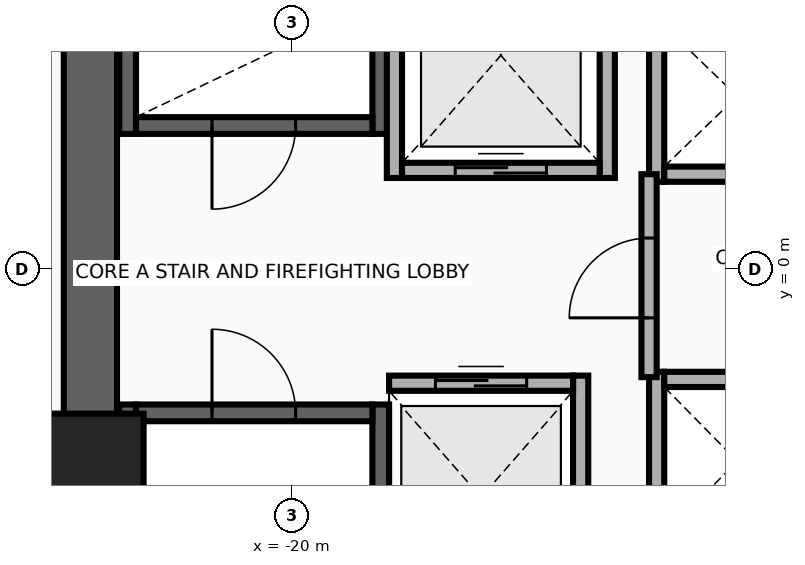
"""IFC4 building model, lengths in metres.
Left out: names, types, materials, properties, quantities, classifications, styles, units other than length and angle.
Written with IfcOpenShell. Run it as: python <this file> out.ifc"""

import sys

from ifc_helpers import new_model, si_unit, direction, frame, frame_2d, origin, origin_2d, place, context, subcontext, project, spatial, rectangle, extrude, source, transform, mapped, element, fill, save


model = new_model("IFC4")
c1 = context("Model", 3, precision=1e-05, world=origin(), true_north=direction((0.0, 1.0)))
c2 = subcontext(c1, "Body", "Model", "MODEL_VIEW")
j1 = project(units=[si_unit("LENGTHUNIT", "METRE"), si_unit("PLANEANGLEUNIT", "RADIAN")], contexts=[c1])
p1 = place(None, origin())
s1 = spatial("IfcSite", under=j1, at=p1, CompositionType="ELEMENT")
p2 = place(p1, origin())
s2 = spatial("IfcBuilding", under=s1, at=p2, CompositionType="ELEMENT")
p3 = place(p2, frame((0.0, 0.0, 96.3)))
s3 = spatial("IfcBuildingStorey", under=s2, at=p3, CompositionType="ELEMENT", Elevation=96.3)
for number, where, z_axis, x_axis in (
    (1, (-22.16, 1.78, 0.0), (0.0, 0.0, 1.0), (0.0, 1.0, 0.0)),
    (2, (-18.83, 1.78, 0.0), (0.0, 0.0, 1.0), (0.0, 1.0, 0.0)),
):
    element("IfcWall", number, at=place(p3, frame(where, z_axis=z_axis, x_axis=x_axis)), inside=s3, PredefinedType="SHEAR", context=c2, shape_type="SweptSolid", body=[
        extrude(rectangle(XDim=8.67, YDim=0.22, at=frame_2d((4.335, 0.0))), origin(), (0.0, 0.0, 1.0), 4.56),
    ])
p4 = place(p3, frame((-22.05, 1.89, 0.0), z_axis=(0.0, 0.0, 1.0), x_axis=(1.0, 0.0, 0.0)))
e3 = element("IfcWall", 3, at=p4, inside=s3, PredefinedType="SHEAR", context=c2, shape_type="SweptSolid", body=[
    extrude(rectangle(XDim=3.11, YDim=0.22, at=frame_2d((1.555, 0.0))), origin(), (0.0, 0.0, 1.0), 4.56),
])
p5 = place(p4, frame((1.0, 0.0, 0.0)))
e4 = element("IfcOpeningElement", 4, at=p5, cuts=e3, PredefinedType="OPENING", context=c2, shape_type="SweptSolid", body=[
    extrude(rectangle(XDim=1.1, YDim=2.15, at=frame_2d((0.55, 1.075))), frame((0.0, 0.125, 0.0), z_axis=(0.0, -1.0, 0.0), x_axis=(1.0, 0.0, 0.0)), (0.0, 0.0, 1.0), 0.25),
])
for number, where, z_axis, x_axis in (
    (5, (-22.16, -10.45, 0.0), (0.0, 0.0, 1.0), (0.0, 1.0, 0.0)),
    (6, (-18.83, -10.45, 0.0), (0.0, 0.0, 1.0), (0.0, 1.0, 0.0)),
):
    element("IfcWall", number, at=place(p3, frame(where, z_axis=z_axis, x_axis=x_axis)), inside=s3, PredefinedType="SHEAR", context=c2, shape_type="SweptSolid", body=[
        extrude(rectangle(XDim=8.67, YDim=0.22, at=frame_2d((4.335, 0.0))), origin(), (0.0, 0.0, 1.0), 4.56),
    ])
p6 = place(p3, frame((-22.05, -1.89, 0.0), z_axis=(0.0, 0.0, 1.0), x_axis=(1.0, 0.0, 0.0)))
e7 = element("IfcWall", 7, at=p6, inside=s3, PredefinedType="SHEAR", context=c2, shape_type="SweptSolid", body=[
    extrude(rectangle(XDim=3.11, YDim=0.22, at=frame_2d((1.555, 0.0))), origin(), (0.0, 0.0, 1.0), 4.56),
])
p7 = place(p6, frame((1.0, 0.0, 0.0)))
e8 = element("IfcOpeningElement", 8, at=p7, cuts=e7, PredefinedType="OPENING", context=c2, shape_type="SweptSolid", body=[
    extrude(rectangle(XDim=1.1, YDim=2.15, at=frame_2d((0.55, 1.075))), frame((0.0, 0.125, 0.0), z_axis=(0.0, -1.0, 0.0), x_axis=(1.0, 0.0, 0.0)), (0.0, 0.0, 1.0), 0.25),
])
p8 = place(p3, frame((-22.65, -11.15, 0.0), z_axis=(0.0, 0.0, 1.0), x_axis=(0.0, 1.0, 0.0)))
e9 = element("IfcWall", 9, at=p8, inside=s3, PredefinedType="SHEAR", context=c2, shape_type="SweptSolid", body=[
    extrude(rectangle(XDim=22.3, YDim=0.7, at=frame_2d((11.15, 0.0))), origin(), (0.0, 0.0, 1.0), 4.56),
])
m1 = source(origin(), c2, "Body", "SweptSolid", [
    extrude(rectangle(XDim=1.4, YDim=1.4, at=origin_2d()), origin(), (0.0, 0.0, 1.0), 4.8),
])
p9 = place(p3, frame((-22.65, -2.6, 0.0), z_axis=(0.0, 0.0, 1.0), x_axis=(1.0, 0.0, 0.0)))
e10 = element("IfcColumn", 10, at=p9, inside=s3, PredefinedType="COLUMN", context=c2, shape_type="MappedRepresentation", body=[
    mapped(m1, transform((0.0, 0.0, 0.0), x_axis=(1.0, 0.0, 0.0), y_axis=(0.0, 1.0, 0.0), z_axis=(0.0, 0.0, 1.0), scale=1.0)),
])
for number, where, z_axis, x_axis in (
    (11, (-18.65, 1.2, 0.0), (0.0, 0.0, 1.0), (0.0, 1.0, 0.0)),
    (12, (-15.85, 1.2, 0.0), (0.0, 0.0, 1.0), (0.0, 1.0, 0.0)),
):
    element("IfcWall", number, at=place(p3, frame(where, z_axis=z_axis, x_axis=x_axis)), inside=s3, PredefinedType="MOVABLE", context=c2, shape_type="SweptSolid", body=[
        extrude(rectangle(XDim=3.225, YDim=0.2, at=frame_2d((1.613, 0.0))), origin(), (0.0, 0.0, 1.0), 4.56),
    ])
p10 = place(p3, frame((-18.55, 1.3, 0.0), z_axis=(0.0, 0.0, 1.0), x_axis=(1.0, 0.0, 0.0)))
e13 = element("IfcWall", 13, at=p10, inside=s3, PredefinedType="MOVABLE", context=c2, shape_type="SweptSolid", body=[
    extrude(rectangle(XDim=2.6, YDim=0.2, at=frame_2d((1.3, 0.0))), origin(), (0.0, 0.0, 1.0), 4.56),
])
p11 = place(p10, frame((0.7, 0.0, 0.0)))
e14 = element("IfcOpeningElement", 14, at=p11, cuts=e13, PredefinedType="OPENING", context=c2, shape_type="SweptSolid", body=[
    extrude(rectangle(XDim=1.2, YDim=2.1, at=frame_2d((0.6, 1.05))), frame((0.0, 0.115, 0.0), z_axis=(0.0, -1.0, 0.0), x_axis=(1.0, 0.0, 0.0)), (0.0, 0.0, 1.0), 0.23),
])
p12 = place(p3, frame((-16.2, -4.6, 0.0), z_axis=(0.0, 0.0, 1.0), x_axis=(0.0, 1.0, 0.0)))
e15 = element("IfcWall", 15, at=p12, inside=s3, PredefinedType="MOVABLE", context=c2, shape_type="SweptSolid", body=[
    extrude(rectangle(XDim=3.2, YDim=0.2, at=frame_2d((1.6, 0.0))), origin(), (0.0, 0.0, 1.0), 4.56),
])
p13 = place(p3, frame((-18.72, -1.5, 0.0), z_axis=(0.0, 0.0, 1.0), x_axis=(1.0, 0.0, 0.0)))
e16 = element("IfcWall", 16, at=p13, inside=s3, PredefinedType="MOVABLE", context=c2, shape_type="SweptSolid", body=[
    extrude(rectangle(XDim=2.42, YDim=0.2, at=frame_2d((1.21, 0.0))), origin(), (0.0, 0.0, 1.0), 4.56),
])
p14 = place(p13, frame((0.61, 0.0, 0.0)))
e17 = element("IfcOpeningElement", 17, at=p14, cuts=e16, PredefinedType="OPENING", context=c2, shape_type="SweptSolid", body=[
    extrude(rectangle(XDim=1.2, YDim=2.1, at=frame_2d((0.6, 1.05))), frame((0.0, 0.115, 0.0), z_axis=(0.0, -1.0, 0.0), x_axis=(1.0, 0.0, 0.0)), (0.0, 0.0, 1.0), 0.23),
])
p15 = place(p3, frame((-15.2, 1.15, 0.0), z_axis=(0.0, 0.0, 1.0), x_axis=(0.0, 1.0, 0.0)))
e18 = element("IfcWall", 18, at=p15, inside=s3, PredefinedType="MOVABLE", context=c2, shape_type="SweptSolid", body=[
    extrude(rectangle(XDim=2.25, YDim=0.2, at=frame_2d((1.125, 0.0))), origin(), (0.0, 0.0, 1.0), 4.56),
])
p16 = place(p3, frame((-15.1, 1.25, 0.0), z_axis=(0.0, 0.0, 1.0), x_axis=(1.0, 0.0, 0.0)))
e19 = element("IfcWall", 19, at=p16, inside=s3, PredefinedType="MOVABLE", context=c2, shape_type="SweptSolid", body=[
    extrude(rectangle(XDim=1.92, YDim=0.2, at=frame_2d((0.96, 0.0))), origin(), (0.0, 0.0, 1.0), 4.56),
])
p17 = place(p3, frame((-15.2, -3.7, 0.0), z_axis=(0.0, 0.0, 1.0), x_axis=(0.0, 1.0, 0.0)))
e20 = element("IfcWall", 20, at=p17, inside=s3, PredefinedType="MOVABLE", context=c2, shape_type="SweptSolid", body=[
    extrude(rectangle(XDim=2.35, YDim=0.2, at=frame_2d((1.175, 0.0))), origin(), (0.0, 0.0, 1.0), 4.56),
])
p18 = place(p3, frame((-15.1, -1.45, 0.0), z_axis=(0.0, 0.0, 1.0), x_axis=(1.0, 0.0, 0.0)))
e21 = element("IfcWall", 21, at=p18, inside=s3, PredefinedType="MOVABLE", context=c2, shape_type="SweptSolid", body=[
    extrude(rectangle(XDim=1.92, YDim=0.2, at=frame_2d((0.96, 0.0))), origin(), (0.0, 0.0, 1.0), 4.56),
])
p19 = place(p3, frame((-15.3, -1.42, 0.0), z_axis=(0.0, 0.0, 1.0), x_axis=(0.0, 1.0, 0.0)))
e22 = element("IfcWall", 22, at=p19, inside=s3, PredefinedType="PARTITIONING", context=c2, shape_type="SweptSolid", body=[
    extrude(rectangle(XDim=2.67, YDim=0.2, at=frame_2d((1.335, 0.0))), origin(), (0.0, 0.0, 1.0), 4.56),
])
p20 = place(p19, frame((0.78, 0.0, 0.0)))
e23 = element("IfcOpeningElement", 23, at=p20, cuts=e22, PredefinedType="OPENING", context=c2, shape_type="SweptSolid", body=[
    extrude(rectangle(XDim=1.05, YDim=2.15, at=frame_2d((0.525, 1.075))), frame((0.0, 0.115, 0.0), z_axis=(0.0, -1.0, 0.0), x_axis=(1.0, 0.0, 0.0)), (0.0, 0.0, 1.0), 0.23),
])
p21 = place(p11, origin())
e24 = element("IfcDoor", 24, at=p21, inside=s3, OperationType="DOUBLE_DOOR_SLIDING", PredefinedType="DOOR", context=c2, shape_type="SweptSolid", body=[
    extrude(rectangle(XDim=1.2, YDim=2.1, at=frame_2d((0.6, 1.05))), frame((0.0, 0.025, 0.0), z_axis=(0.0, -1.0, 0.0), x_axis=(1.0, 0.0, 0.0)), (0.0, 0.0, 1.0), 0.05),
])
fill(e14, e24)
p22 = place(p14, origin())
e25 = element("IfcDoor", 25, at=p22, inside=s3, OperationType="DOUBLE_DOOR_SLIDING", PredefinedType="DOOR", context=c2, shape_type="SweptSolid", body=[
    extrude(rectangle(XDim=1.2, YDim=2.1, at=frame_2d((0.6, 1.05))), frame((0.0, 0.025, 0.0), z_axis=(0.0, -1.0, 0.0), x_axis=(1.0, 0.0, 0.0)), (0.0, 0.0, 1.0), 0.05),
])
fill(e17, e25)
p23 = place(p20, origin())
e26 = element("IfcDoor", 26, at=p23, inside=s3, OperationType="SINGLE_SWING_RIGHT", PredefinedType="DOOR", context=c2, shape_type="SweptSolid", body=[
    extrude(rectangle(XDim=1.05, YDim=2.15, at=frame_2d((0.525, 1.075))), frame((0.0, 0.025, 0.0), z_axis=(0.0, -1.0, 0.0), x_axis=(1.0, 0.0, 0.0)), (0.0, 0.0, 1.0), 0.05),
])
fill(e23, e26)
p24 = place(p5, frame((1.1, 0.0, 0.0), z_axis=(0.0, 0.0, 1.0), x_axis=(-1.0, 0.0, 0.0)))
e27 = element("IfcDoor", 27, at=p24, inside=s3, OperationType="SINGLE_SWING_LEFT", PredefinedType="DOOR", context=c2, shape_type="SweptSolid", body=[
    extrude(rectangle(XDim=1.1, YDim=2.15, at=frame_2d((0.55, 1.075))), frame((0.0, 0.025, 0.0), z_axis=(0.0, -1.0, 0.0), x_axis=(1.0, 0.0, 0.0)), (0.0, 0.0, 1.0), 0.05),
])
fill(e4, e27)
p25 = place(p7, origin())
e28 = element("IfcDoor", 28, at=p25, inside=s3, OperationType="SINGLE_SWING_RIGHT", PredefinedType="DOOR", context=c2, shape_type="SweptSolid", body=[
    extrude(rectangle(XDim=1.1, YDim=2.15, at=frame_2d((0.55, 1.075))), frame((0.0, 0.025, 0.0), z_axis=(0.0, -1.0, 0.0), x_axis=(1.0, 0.0, 0.0)), (0.0, 0.0, 1.0), 0.05),
])
fill(e8, e28)
save(model, sys.argv[1])
